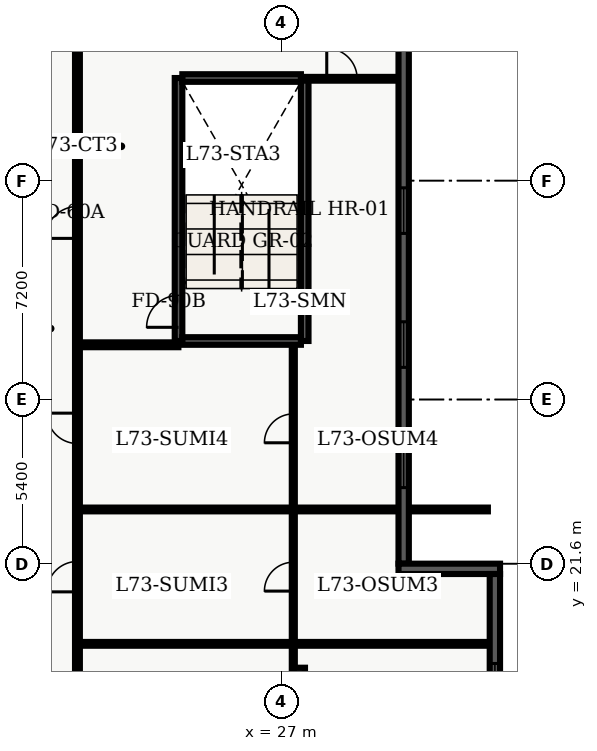
"""IFC4 building model, lengths in metres.
Left out: names, types, materials, properties, quantities, classifications, styles, units other than length and angle.
Written with IfcOpenShell. Run it as: python <this file> out.ifc"""

import sys

from ifc_helpers import new_model, entity, si_unit, converted_unit, direction, frame, origin_with_axes, origin_2d_with_axis, place, context, subcontext, project, spatial, polyline, rectangle, i_section, outline, extrude, element, fill, save


model = new_model("IFC4")
c1 = context("Model", 3, precision=1e-05, world=origin_with_axes(), true_north=direction((0.0, 1.0)))
c2 = subcontext(c1, "Body", "Model", "MODEL_VIEW")
j1 = project(units=[si_unit("LENGTHUNIT", "METRE"), converted_unit("PLANEANGLEUNIT", "DEGREE", entity("IfcPlaneAngleMeasure", 0.017), si_unit("PLANEANGLEUNIT", "RADIAN"), dimensions=[0, 0, 0, 0, 0, 0, 0])], contexts=[c1])
p1 = place(None, origin_with_axes())
s1 = spatial("IfcSite", under=j1, at=p1, CompositionType="ELEMENT")
p2 = place(p1, origin_with_axes())
s2 = spatial("IfcBuilding", under=s1, at=p2, CompositionType="ELEMENT")
p3 = place(p2, frame((0.0, 0.0, 295.8), z_axis=(0.0, 0.0, 1.0), x_axis=(1.0, 0.0, 0.0)))
s3 = spatial("IfcBuildingStorey", under=s2, at=p3, CompositionType="ELEMENT", Elevation=295.8)
p4 = place(p3, frame((23.625, 28.925, 0.0), z_axis=(0.0, 0.0, 1.0), x_axis=(0.0, 1.0, 0.0)))
e1 = element("IfcWall", 1, at=p4, inside=s3, PredefinedType="SHEAR", context=c2, shape_type="SweptSolid", body=[
    extrude(outline(polyline([(0.0, -0.125), (8.65, -0.125), (8.65, 0.125), (0.0, 0.125), (0.0, -0.125)])), origin_with_axes(), (0.0, 0.0, 1.0), 3.66),
])
p5 = place(p4, frame((0.975, 0.0, 0.0), z_axis=(0.0, 0.0, 1.0), x_axis=(1.0, 0.0, 0.0)))
e2 = element("IfcOpeningElement", 2, at=p5, cuts=e1, PredefinedType="OPENING", context=c2, shape_type="SweptSolid", body=[
    extrude(rectangle(XDim=1.05, YDim=0.27, at=origin_2d_with_axis()), origin_with_axes(), (0.0, 0.0, 1.0), 2.15),
])
p6 = place(p3, frame((27.775, 28.925, 0.0), z_axis=(0.0, 0.0, 1.0), x_axis=(0.0, 1.0, 0.0)))
e3 = element("IfcWall", 3, at=p6, inside=s3, PredefinedType="SHEAR", context=c2, shape_type="SweptSolid", body=[
    extrude(outline(polyline([(0.0, -0.125), (8.65, -0.125), (8.65, 0.125), (0.0, 0.125), (0.0, -0.125)])), origin_with_axes(), (0.0, 0.0, 1.0), 3.66),
])
for number, where, z_axis, x_axis in (
    (4, (23.75, 28.925, 0.0), (0.0, 0.0, 1.0), (1.0, 0.0, 0.0)),
    (5, (23.75, 37.575, 0.0), (0.0, 0.0, 1.0), (1.0, 0.0, 0.0)),
):
    element("IfcWall", number, at=place(p3, frame(where, z_axis=z_axis, x_axis=x_axis)), inside=s3, PredefinedType="SHEAR", context=c2, shape_type="SweptSolid", body=[
        extrude(outline(polyline([(0.0, -0.125), (3.9, -0.125), (3.9, 0.125), (0.0, 0.125), (0.0, -0.125)])), origin_with_axes(), (0.0, 0.0, 1.0), 3.66),
    ])
p7 = place(p3, frame((27.6, 18.0, 0.0), z_axis=(0.0, 0.0, 1.0), x_axis=(1.0, 0.0, 0.0)))
e6 = element("IfcColumn", 6, at=p7, inside=s3, PredefinedType="COLUMN", context=c2, shape_type="SweptSolid", body=[
    extrude(i_section(OverallWidth=0.369, OverallDepth=0.356, WebThickness=0.011, FlangeThickness=0.018, FilletRadius=0.018, at=origin_2d_with_axis()), origin_with_axes(), (0.0, 0.0, 1.0), 3.9),
])
p8 = place(p3, frame((20.3, 2.14, 0.0), z_axis=(0.0, 0.0, 1.0), x_axis=(0.0, 1.0, 0.0)))
e7 = element("IfcWall", 7, at=p8, inside=s3, PredefinedType="PARTITIONING", context=c2, shape_type="SweptSolid", body=[
    extrude(outline(polyline([(0.0, -0.08), (38.36, -0.08), (38.36, 0.08), (0.0, 0.08), (0.0, -0.08)])), origin_with_axes(), (0.0, 0.0, 1.0), 2.7),
])
p9 = place(p8, frame((30.685, 0.0, 0.0), z_axis=(0.0, 0.0, 1.0), x_axis=(1.0, 0.0, 0.0)))
e8 = element("IfcOpeningElement", 8, at=p9, cuts=e7, PredefinedType="OPENING", context=c2, shape_type="SweptSolid", body=[
    extrude(rectangle(XDim=1.05, YDim=0.18, at=origin_2d_with_axis()), origin_with_axes(), (0.0, 0.0, 1.0), 2.15),
])
p10 = place(p8, frame((3.524, 0.0, 0.0), z_axis=(0.0, 0.0, 1.0), x_axis=(1.0, 0.0, 0.0)))
e9 = element("IfcOpeningElement", 9, at=p10, cuts=e7, PredefinedType="OPENING", context=c2, shape_type="SweptSolid", body=[
    extrude(rectangle(XDim=1.0, YDim=0.18, at=origin_2d_with_axis()), origin_with_axes(), (0.0, 0.0, 1.0), 2.15),
])
p11 = place(p8, frame((12.23, 0.0, 0.0), z_axis=(0.0, 0.0, 1.0), x_axis=(1.0, 0.0, 0.0)))
e10 = element("IfcOpeningElement", 10, at=p11, cuts=e7, PredefinedType="OPENING", context=c2, shape_type="SweptSolid", body=[
    extrude(rectangle(XDim=1.0, YDim=0.18, at=origin_2d_with_axis()), origin_with_axes(), (0.0, 0.0, 1.0), 2.15),
])
p12 = place(p8, frame((19.033, 0.0, 0.0), z_axis=(0.0, 0.0, 1.0), x_axis=(1.0, 0.0, 0.0)))
e11 = element("IfcOpeningElement", 11, at=p12, cuts=e7, PredefinedType="OPENING", context=c2, shape_type="SweptSolid", body=[
    extrude(rectangle(XDim=1.0, YDim=0.18, at=origin_2d_with_axis()), origin_with_axes(), (0.0, 0.0, 1.0), 2.15),
])
p13 = place(p8, frame((23.912, 0.0, 0.0), z_axis=(0.0, 0.0, 1.0), x_axis=(1.0, 0.0, 0.0)))
e12 = element("IfcOpeningElement", 12, at=p13, cuts=e7, PredefinedType="OPENING", context=c2, shape_type="SweptSolid", body=[
    extrude(rectangle(XDim=1.0, YDim=0.18, at=origin_2d_with_axis()), origin_with_axes(), (0.0, 0.0, 1.0), 2.15),
])
p14 = place(p3, frame((20.3, 28.8, 0.0), z_axis=(0.0, 0.0, 1.0), x_axis=(1.0, 0.0, 0.0)))
e13 = element("IfcWall", 13, at=p14, inside=s3, PredefinedType="PARTITIONING", context=c2, shape_type="SweptSolid", body=[
    extrude(outline(polyline([(0.0, -0.08), (3.32, -0.08), (3.32, 0.08), (0.0, 0.08), (0.0, -0.08)])), origin_with_axes(), (0.0, 0.0, 1.0), 2.7),
])
p15 = place(p3, frame((27.4, 2.135, 0.0), z_axis=(0.0, 0.0, 1.0), x_axis=(0.0, 1.0, 0.0)))
e14 = element("IfcWall", 14, at=p15, inside=s3, PredefinedType="PARTITIONING", context=c2, shape_type="SweptSolid", body=[
    extrude(outline(polyline([(0.0, -0.05), (26.515, -0.05), (26.515, 0.05), (0.0, 0.05), (0.0, -0.05)])), origin_with_axes(), (0.0, 0.0, 1.0), 2.7),
])
p16 = place(p15, frame((3.809, 0.0, 0.0), z_axis=(0.0, 0.0, 1.0), x_axis=(1.0, 0.0, 0.0)))
e15 = element("IfcOpeningElement", 15, at=p16, cuts=e14, PredefinedType="OPENING", context=c2, shape_type="SweptSolid", body=[
    extrude(rectangle(XDim=0.95, YDim=0.12, at=origin_2d_with_axis()), origin_with_axes(), (0.0, 0.0, 1.0), 2.15),
])
p17 = place(p15, frame((12.236, 0.0, 0.0), z_axis=(0.0, 0.0, 1.0), x_axis=(1.0, 0.0, 0.0)))
e16 = element("IfcOpeningElement", 16, at=p17, cuts=e14, PredefinedType="OPENING", context=c2, shape_type="SweptSolid", body=[
    extrude(rectangle(XDim=0.95, YDim=0.12, at=origin_2d_with_axis()), origin_with_axes(), (0.0, 0.0, 1.0), 2.15),
])
p18 = place(p15, frame((19.038, 0.0, 0.0), z_axis=(0.0, 0.0, 1.0), x_axis=(1.0, 0.0, 0.0)))
e17 = element("IfcOpeningElement", 17, at=p18, cuts=e14, PredefinedType="OPENING", context=c2, shape_type="SweptSolid", body=[
    extrude(rectangle(XDim=0.95, YDim=0.12, at=origin_2d_with_axis()), origin_with_axes(), (0.0, 0.0, 1.0), 2.15),
])
p19 = place(p15, frame((23.916, 0.0, 0.0), z_axis=(0.0, 0.0, 1.0), x_axis=(1.0, 0.0, 0.0)))
e18 = element("IfcOpeningElement", 18, at=p19, cuts=e14, PredefinedType="OPENING", context=c2, shape_type="SweptSolid", body=[
    extrude(rectangle(XDim=0.95, YDim=0.12, at=origin_2d_with_axis()), origin_with_axes(), (0.0, 0.0, 1.0), 2.15),
])
p20 = place(p3, frame((20.45, 18.963, 0.0), z_axis=(0.0, 0.0, 1.0), x_axis=(1.0, 0.0, 0.0)))
e19 = element("IfcWall", 19, at=p20, inside=s3, PredefinedType="PARTITIONING", context=c2, shape_type="SweptSolid", body=[
    extrude(outline(polyline([(0.0, -0.062), (13.415, -0.062), (13.415, 0.062), (0.0, 0.062), (0.0, -0.062)])), origin_with_axes(), (0.0, 0.0, 1.0), 2.7),
])
p21 = place(p3, frame((20.45, 23.383, 0.0), z_axis=(0.0, 0.0, 1.0), x_axis=(1.0, 0.0, 0.0)))
e20 = element("IfcWall", 20, at=p21, inside=s3, PredefinedType="PARTITIONING", context=c2, shape_type="SweptSolid", body=[
    extrude(outline(polyline([(0.0, -0.062), (13.35, -0.062), (13.35, 0.062), (0.0, 0.062), (0.0, -0.062)])), origin_with_axes(), (0.0, 0.0, 1.0), 2.7),
])
p22 = place(p3, frame((27.85, 37.55, 0.0), z_axis=(0.0, 0.0, 1.0), x_axis=(1.0, 0.0, 0.0)))
e21 = element("IfcWall", 21, at=p22, inside=s3, PredefinedType="PARTITIONING", context=c2, shape_type="SweptSolid", body=[
    extrude(outline(polyline([(0.0, -0.062), (3.015, -0.062), (3.015, 0.062), (0.0, 0.062), (0.0, -0.062)])), origin_with_axes(), (0.0, 0.0, 1.0), 2.7),
])
p23 = place(p22, frame((1.15, 0.0, 0.0), z_axis=(0.0, 0.0, 1.0), x_axis=(1.0, 0.0, 0.0)))
e22 = element("IfcOpeningElement", 22, at=p23, cuts=e21, PredefinedType="OPENING", context=c2, shape_type="SweptSolid", body=[
    extrude(rectangle(XDim=1.0, YDim=0.145, at=origin_2d_with_axis()), origin_with_axes(), (0.0, 0.0, 1.0), 2.15),
])
p24 = place(p3, frame((31.03, 40.42, 0.0), z_axis=(0.0, 0.0, 1.0), x_axis=(0.0, -1.0, 0.0)))
e23 = element("IfcWall", 23, at=p24, inside=s3, PredefinedType="SOLIDWALL", context=c2, shape_type="SweptSolid", body=[
    extrude(outline(polyline([(0.0, -0.17), (18.82, -0.17), (18.82, 0.17), (0.0, 0.17), (0.0, -0.17)])), origin_with_axes(), (0.0, 0.0, 1.0), 3.66),
])
p25 = place(p24, frame((7.207, 0.0, 0.45), z_axis=(0.0, 0.0, 1.0), x_axis=(1.0, 0.0, 0.0)))
e24 = element("IfcOpeningElement", 24, at=p25, cuts=e23, PredefinedType="OPENING", context=c2, shape_type="SweptSolid", body=[
    extrude(rectangle(XDim=1.5, YDim=0.36, at=origin_2d_with_axis()), origin_with_axes(), (0.0, 0.0, 1.0), 2.1),
])
p26 = place(p24, frame((11.613, 0.0, 0.45), z_axis=(0.0, 0.0, 1.0), x_axis=(1.0, 0.0, 0.0)))
e25 = element("IfcOpeningElement", 25, at=p26, cuts=e23, PredefinedType="OPENING", context=c2, shape_type="SweptSolid", body=[
    extrude(rectangle(XDim=1.5, YDim=0.36, at=origin_2d_with_axis()), origin_with_axes(), (0.0, 0.0, 1.0), 2.1),
])
p27 = place(p24, frame((15.568, 0.0, 0.45), z_axis=(0.0, 0.0, 1.0), x_axis=(1.0, 0.0, 0.0)))
e26 = element("IfcOpeningElement", 26, at=p27, cuts=e23, PredefinedType="OPENING", context=c2, shape_type="SweptSolid", body=[
    extrude(rectangle(XDim=1.5, YDim=0.36, at=origin_2d_with_axis()), origin_with_axes(), (0.0, 0.0, 1.0), 2.1),
])
p28 = place(p3, frame((30.86, 21.43, 0.0), z_axis=(0.0, 0.0, 1.0), x_axis=(1.0, 0.0, 0.0)))
e27 = element("IfcWall", 27, at=p28, inside=s3, PredefinedType="SOLIDWALL", context=c2, shape_type="SweptSolid", body=[
    extrude(outline(polyline([(0.0, -0.17), (3.34, -0.17), (3.34, 0.17), (0.0, 0.17), (0.0, -0.17)])), origin_with_axes(), (0.0, 0.0, 1.0), 3.66),
])
p29 = place(p3, frame((34.03, 21.26, 0.0), z_axis=(0.0, 0.0, 1.0), x_axis=(0.0, -1.0, 0.0)))
e28 = element("IfcWall", 28, at=p29, inside=s3, PredefinedType="SOLIDWALL", context=c2, shape_type="SweptSolid", body=[
    extrude(outline(polyline([(0.0, -0.17), (17.06, -0.17), (17.06, 0.17), (0.0, 0.17), (0.0, -0.17)])), origin_with_axes(), (0.0, 0.0, 1.0), 3.66),
])
p30 = place(p29, frame((3.693, 0.0, 0.45), z_axis=(0.0, 0.0, 1.0), x_axis=(1.0, 0.0, 0.0)))
e29 = element("IfcOpeningElement", 29, at=p30, cuts=e28, PredefinedType="OPENING", context=c2, shape_type="SweptSolid", body=[
    extrude(rectangle(XDim=1.5, YDim=0.36, at=origin_2d_with_axis()), origin_with_axes(), (0.0, 0.0, 1.0), 2.1),
])
p31 = place(p29, frame((8.53, 0.0, 0.45), z_axis=(0.0, 0.0, 1.0), x_axis=(1.0, 0.0, 0.0)))
e30 = element("IfcOpeningElement", 30, at=p31, cuts=e28, PredefinedType="OPENING", context=c2, shape_type="SweptSolid", body=[
    extrude(rectangle(XDim=1.5, YDim=0.36, at=origin_2d_with_axis()), origin_with_axes(), (0.0, 0.0, 1.0), 2.1),
])
p32 = place(p29, frame((13.817, 0.0, 0.45), z_axis=(0.0, 0.0, 1.0), x_axis=(1.0, 0.0, 0.0)))
e31 = element("IfcOpeningElement", 31, at=p32, cuts=e28, PredefinedType="OPENING", context=c2, shape_type="SweptSolid", body=[
    extrude(rectangle(XDim=1.5, YDim=0.36, at=origin_2d_with_axis()), origin_with_axes(), (0.0, 0.0, 1.0), 2.1),
])
p33 = place(p4, frame((0.975, 0.0, 0.0), z_axis=(0.0, 0.0, 1.0), x_axis=(1.0, 0.0, 0.0)))
e32 = element("IfcDoor", 32, at=p33, inside=s3, OperationType="SINGLE_SWING_LEFT", PredefinedType="DOOR", context=c2, shape_type="SweptSolid", body=[
    extrude(rectangle(XDim=1.05, YDim=0.09, at=origin_2d_with_axis()), origin_with_axes(), (0.0, 0.0, 1.0), 2.15),
])
fill(e2, e32)
p34 = place(p8, frame((30.685, 0.0, 0.0), z_axis=(0.0, 0.0, 1.0), x_axis=(1.0, 0.0, 0.0)))
e33 = element("IfcDoor", 33, at=p34, inside=s3, OperationType="SINGLE_SWING_LEFT", PredefinedType="DOOR", context=c2, shape_type="SweptSolid", body=[
    extrude(rectangle(XDim=1.05, YDim=0.09, at=origin_2d_with_axis()), origin_with_axes(), (0.0, 0.0, 1.0), 2.15),
])
fill(e8, e33)
p35 = place(p15, frame((19.038, 0.0, 0.0), z_axis=(0.0, 0.0, 1.0), x_axis=(1.0, 0.0, 0.0)))
e34 = element("IfcDoor", 34, at=p35, inside=s3, OperationType="SINGLE_SWING_LEFT", PredefinedType="DOOR", context=c2, shape_type="SweptSolid", body=[
    extrude(rectangle(XDim=0.95, YDim=0.06, at=origin_2d_with_axis()), origin_with_axes(), (0.0, 0.0, 1.0), 2.15),
])
fill(e17, e34)
p36 = place(p8, frame((19.033, 0.0, 0.0), z_axis=(0.0, 0.0, 1.0), x_axis=(1.0, 0.0, 0.0)))
e35 = element("IfcDoor", 35, at=p36, inside=s3, OperationType="SINGLE_SWING_LEFT", PredefinedType="DOOR", context=c2, shape_type="SweptSolid", body=[
    extrude(rectangle(XDim=1.0, YDim=0.09, at=origin_2d_with_axis()), origin_with_axes(), (0.0, 0.0, 1.0), 2.15),
])
fill(e11, e35)
p37 = place(p15, frame((23.916, 0.0, 0.0), z_axis=(0.0, 0.0, 1.0), x_axis=(1.0, 0.0, 0.0)))
e36 = element("IfcDoor", 36, at=p37, inside=s3, OperationType="SINGLE_SWING_LEFT", PredefinedType="DOOR", context=c2, shape_type="SweptSolid", body=[
    extrude(rectangle(XDim=0.95, YDim=0.06, at=origin_2d_with_axis()), origin_with_axes(), (0.0, 0.0, 1.0), 2.15),
])
fill(e18, e36)
p38 = place(p8, frame((23.912, 0.0, 0.0), z_axis=(0.0, 0.0, 1.0), x_axis=(1.0, 0.0, 0.0)))
e37 = element("IfcDoor", 37, at=p38, inside=s3, OperationType="SINGLE_SWING_RIGHT", PredefinedType="DOOR", context=c2, shape_type="SweptSolid", body=[
    extrude(rectangle(XDim=1.0, YDim=0.09, at=origin_2d_with_axis()), origin_with_axes(), (0.0, 0.0, 1.0), 2.15),
])
fill(e12, e37)
p39 = place(p22, frame((1.15, 0.0, 0.0), z_axis=(0.0, 0.0, 1.0), x_axis=(1.0, 0.0, 0.0)))
e38 = element("IfcDoor", 38, at=p39, inside=s3, OperationType="SINGLE_SWING_LEFT", PredefinedType="DOOR", context=c2, shape_type="SweptSolid", body=[
    extrude(rectangle(XDim=1.0, YDim=0.075, at=origin_2d_with_axis()), origin_with_axes(), (0.0, 0.0, 1.0), 2.15),
])
fill(e22, e38)
p40 = place(p24, frame((7.207, 0.0, 0.45), z_axis=(0.0, 0.0, 1.0), x_axis=(1.0, 0.0, 0.0)))
e39 = element("IfcWindow", 39, at=p40, inside=s3, PredefinedType="WINDOW", context=c2, shape_type="SweptSolid", body=[
    extrude(rectangle(XDim=1.5, YDim=0.09, at=origin_2d_with_axis()), origin_with_axes(), (0.0, 0.0, 1.0), 2.1),
])
fill(e24, e39)
p41 = place(p24, frame((11.613, 0.0, 0.45), z_axis=(0.0, 0.0, 1.0), x_axis=(1.0, 0.0, 0.0)))
e40 = element("IfcWindow", 40, at=p41, inside=s3, PredefinedType="WINDOW", context=c2, shape_type="SweptSolid", body=[
    extrude(rectangle(XDim=1.5, YDim=0.09, at=origin_2d_with_axis()), origin_with_axes(), (0.0, 0.0, 1.0), 2.1),
])
fill(e25, e40)
p42 = place(p24, frame((15.568, 0.0, 0.45), z_axis=(0.0, 0.0, 1.0), x_axis=(1.0, 0.0, 0.0)))
e41 = element("IfcWindow", 41, at=p42, inside=s3, PredefinedType="WINDOW", context=c2, shape_type="SweptSolid", body=[
    extrude(rectangle(XDim=1.5, YDim=0.09, at=origin_2d_with_axis()), origin_with_axes(), (0.0, 0.0, 1.0), 2.1),
])
fill(e26, e41)
p43 = place(p29, frame((3.693, 0.0, 0.45), z_axis=(0.0, 0.0, 1.0), x_axis=(1.0, 0.0, 0.0)))
e42 = element("IfcWindow", 42, at=p43, inside=s3, PredefinedType="WINDOW", context=c2, shape_type="SweptSolid", body=[
    extrude(rectangle(XDim=1.5, YDim=0.09, at=origin_2d_with_axis()), origin_with_axes(), (0.0, 0.0, 1.0), 2.1),
])
fill(e29, e42)
save(model, sys.argv[1])
